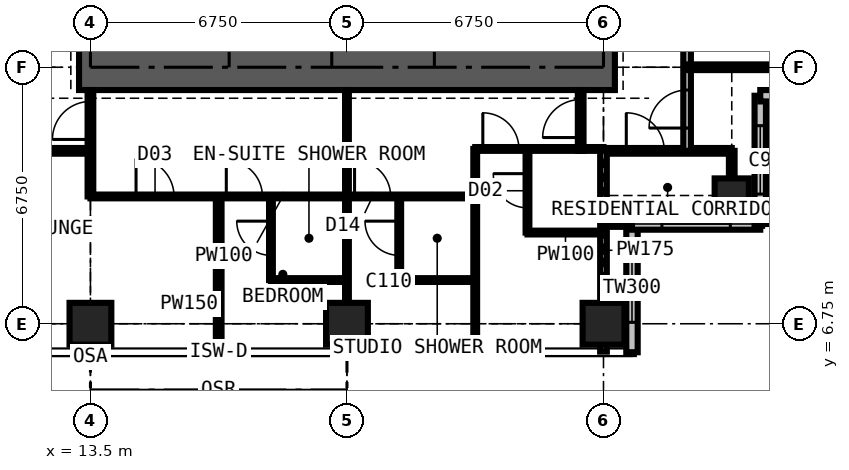
"""IFC4 building model, lengths in metres.
Left out: names, types, materials, properties, quantities, classifications, styles, units other than length and angle.
Written with IfcOpenShell. Run it as: python <this file> out.ifc"""

import sys

from ifc_helpers import new_model, si_unit, direction, frame, frame_2d, origin, origin_2d, place, context, subcontext, project, spatial, rectangle, extrude, element, fill, save


model = new_model("IFC4")
c1 = context("Model", 3, precision=1e-05, world=origin(), true_north=direction((0.0, 1.0)))
c2 = subcontext(c1, "Body", "Model", "MODEL_VIEW")
j1 = project(units=[si_unit("LENGTHUNIT", "METRE"), si_unit("PLANEANGLEUNIT", "RADIAN")], contexts=[c1])
p1 = place(None, origin())
s1 = spatial("IfcSite", under=j1, at=p1, CompositionType="ELEMENT")
p2 = place(p1, origin())
s2 = spatial("IfcBuilding", under=s1, at=p2, CompositionType="ELEMENT")
p3 = place(p2, frame((0.0, 0.0, 222.3)))
s3 = spatial("IfcBuildingStorey", under=s2, at=p3, CompositionType="ELEMENT", Elevation=222.3)
for number, where, z_axis, x_axis in (
    (1, (13.5, 6.75, 0.0), (0.0, 0.0, 1.0), (1.0, 0.0, 0.0)),
    (2, (20.25, 6.75, 0.0), (0.0, 0.0, 1.0), (1.0, 0.0, 0.0)),
    (3, (27.0, 6.75, 0.0), (0.0, 0.0, 1.0), (1.0, 0.0, 0.0)),
):
    element("IfcColumn", number, at=place(p3, frame(where, z_axis=z_axis, x_axis=x_axis)), inside=s3, PredefinedType="COLUMN", context=c2, shape_type="SweptSolid", body=[
        extrude(rectangle(XDim=1.1, YDim=1.1, at=origin_2d()), origin(), (0.0, 0.0, 1.0), 3.6),
    ])
p4 = place(p3, frame((30.375, 10.125, 0.0), z_axis=(0.0, 0.0, 1.0), x_axis=(1.0, 0.0, 0.0)))
e4 = element("IfcColumn", 4, at=p4, inside=s3, PredefinedType="COLUMN", context=c2, shape_type="SweptSolid", body=[
    extrude(rectangle(XDim=0.9, YDim=0.9, at=origin_2d()), origin(), (0.0, 0.0, 1.0), 3.6),
])
p5 = place(p3, frame((13.2, 13.5, 0.0), z_axis=(0.0, 0.0, 1.0), x_axis=(1.0, 0.0, 0.0)))
e5 = element("IfcWall", 5, at=p5, inside=s3, PredefinedType="SHEAR", context=c2, shape_type="SweptSolid", body=[
    extrude(rectangle(XDim=14.1, YDim=1.2, at=frame_2d((7.05, 0.0))), origin(), (0.0, 0.0, 1.0), 3.6),
])
p6 = place(p3, frame((27.75, 6.0, 0.0), z_axis=(0.0, 0.0, 1.0), x_axis=(0.0, 1.0, 0.0)))
e6 = element("IfcWall", 6, at=p6, inside=s3, PredefinedType="SOLIDWALL", context=c2, shape_type="SweptSolid", body=[
    extrude(rectangle(XDim=3.375, YDim=0.3, at=frame_2d((1.688, 0.0))), origin(), (0.0, 0.0, 1.0), 3.375),
])
p7 = place(p6, frame((0.788, 0.0, 0.6)))
e7 = element("IfcOpeningElement", 7, at=p7, cuts=e6, PredefinedType="OPENING", context=c2, shape_type="SweptSolid", body=[
    extrude(rectangle(XDim=1.8, YDim=2.1, at=frame_2d((0.9, 1.05))), frame((0.0, 0.16, 0.0), z_axis=(0.0, -1.0, 0.0), x_axis=(1.0, 0.0, 0.0)), (0.0, 0.0, 1.0), 0.32),
])
p8 = place(p3, frame((27.75, 9.375, 0.0), z_axis=(0.0, 0.0, 1.0), x_axis=(1.0, 0.0, 0.0)))
e8 = element("IfcWall", 8, at=p8, inside=s3, PredefinedType="SOLIDWALL", context=c2, shape_type="SweptSolid", body=[
    extrude(rectangle(XDim=3.375, YDim=0.3, at=frame_2d((1.688, 0.0))), origin(), (0.0, 0.0, 1.0), 3.375),
])
p9 = place(p8, frame((0.788, 0.0, 0.6)))
e9 = element("IfcOpeningElement", 9, at=p9, cuts=e8, PredefinedType="OPENING", context=c2, shape_type="SweptSolid", body=[
    extrude(rectangle(XDim=1.8, YDim=2.1, at=frame_2d((0.9, 1.05))), frame((0.0, 0.16, 0.0), z_axis=(0.0, -1.0, 0.0), x_axis=(1.0, 0.0, 0.0)), (0.0, 0.0, 1.0), 0.32),
])
p10 = place(p3, frame((31.125, 9.375, 0.0), z_axis=(0.0, 0.0, 1.0), x_axis=(0.0, 1.0, 0.0)))
e10 = element("IfcWall", 10, at=p10, inside=s3, PredefinedType="SOLIDWALL", context=c2, shape_type="SweptSolid", body=[
    extrude(rectangle(XDim=3.375, YDim=0.3, at=frame_2d((1.688, 0.0))), origin(), (0.0, 0.0, 1.0), 3.375),
])
p11 = place(p10, frame((0.788, 0.0, 0.6)))
e11 = element("IfcOpeningElement", 11, at=p11, cuts=e10, PredefinedType="OPENING", context=c2, shape_type="SweptSolid", body=[
    extrude(rectangle(XDim=1.8, YDim=2.1, at=frame_2d((0.9, 1.05))), frame((0.0, 0.16, 0.0), z_axis=(0.0, -1.0, 0.0), x_axis=(1.0, 0.0, 0.0)), (0.0, 0.0, 1.0), 0.32),
])
p12 = place(p3, frame((31.125, 12.75, 0.0), z_axis=(0.0, 0.0, 1.0), x_axis=(1.0, 0.0, 0.0)))
e12 = element("IfcWall", 12, at=p12, inside=s3, PredefinedType="SOLIDWALL", context=c2, shape_type="SweptSolid", body=[
    extrude(rectangle(XDim=3.375, YDim=0.3, at=frame_2d((1.688, 0.0))), origin(), (0.0, 0.0, 1.0), 3.375),
])
p13 = place(p12, frame((0.788, 0.0, 0.6)))
e13 = element("IfcOpeningElement", 13, at=p13, cuts=e12, PredefinedType="OPENING", context=c2, shape_type="SweptSolid", body=[
    extrude(rectangle(XDim=1.8, YDim=2.1, at=frame_2d((0.9, 1.05))), frame((0.0, 0.16, 0.0), z_axis=(0.0, -1.0, 0.0), x_axis=(1.0, 0.0, 0.0)), (0.0, 0.0, 1.0), 0.32),
])
p14 = place(p3, frame((10.125, 11.3, 0.0), z_axis=(0.0, 0.0, 1.0), x_axis=(1.0, 0.0, 0.0)))
e14 = element("IfcWall", 14, at=p14, inside=s3, PredefinedType="PARTITIONING", context=c2, shape_type="SweptSolid", body=[
    extrude(rectangle(XDim=3.375, YDim=0.15, at=frame_2d((1.688, 0.0))), origin(), (0.0, 0.0, 1.0), 3.375),
])
p15 = place(p3, frame((13.5, 10.1, 0.0), z_axis=(0.0, 0.0, 1.0), x_axis=(0.0, 1.0, 0.0)))
e15 = element("IfcWall", 15, at=p15, inside=s3, PredefinedType="PARTITIONING", context=c2, shape_type="SweptSolid", body=[
    extrude(rectangle(XDim=2.8, YDim=0.15, at=frame_2d((1.4, 0.0))), origin(), (0.0, 0.0, 1.0), 2.877),
])
p16 = place(p15, frame((1.5, 0.0, 0.0)))
e16 = element("IfcOpeningElement", 16, at=p16, cuts=e15, PredefinedType="OPENING", context=c2, shape_type="SweptSolid", body=[
    extrude(rectangle(XDim=1.0, YDim=2.2, at=frame_2d((0.5, 1.1))), frame((0.0, 0.085, 0.0), z_axis=(0.0, -1.0, 0.0), x_axis=(1.0, 0.0, 0.0)), (0.0, 0.0, 1.0), 0.17),
])
p17 = place(p3, frame((13.5, 10.1, 0.0), z_axis=(0.0, 0.0, 1.0), x_axis=(1.0, 0.0, 0.0)))
e17 = element("IfcWall", 17, at=p17, inside=s3, PredefinedType="PARTITIONING", context=c2, shape_type="SweptSolid", body=[
    extrude(rectangle(XDim=10.125, YDim=0.1, at=frame_2d((5.062, 0.0))), origin(), (0.0, 0.0, 1.0), 3.375),
])
p18 = place(p17, frame((1.2, 0.0, 0.0)))
e18 = element("IfcOpeningElement", 18, at=p18, cuts=e17, PredefinedType="OPENING", context=c2, shape_type="SweptSolid", body=[
    extrude(rectangle(XDim=1.0, YDim=2.2, at=frame_2d((0.5, 1.1))), frame((0.0, 0.06, 0.0), z_axis=(0.0, -1.0, 0.0), x_axis=(1.0, 0.0, 0.0)), (0.0, 0.0, 1.0), 0.12),
])
p19 = place(p17, frame((3.575, 0.0, 0.0)))
e19 = element("IfcOpeningElement", 19, at=p19, cuts=e17, PredefinedType="OPENING", context=c2, shape_type="SweptSolid", body=[
    extrude(rectangle(XDim=0.95, YDim=2.2, at=frame_2d((0.475, 1.1))), frame((0.0, 0.06, 0.0), z_axis=(0.0, -1.0, 0.0), x_axis=(1.0, 0.0, 0.0)), (0.0, 0.0, 1.0), 0.12),
])
p20 = place(p17, frame((6.95, 0.0, 0.0)))
e20 = element("IfcOpeningElement", 20, at=p20, cuts=e17, PredefinedType="OPENING", context=c2, shape_type="SweptSolid", body=[
    extrude(rectangle(XDim=0.95, YDim=2.2, at=frame_2d((0.475, 1.1))), frame((0.0, 0.06, 0.0), z_axis=(0.0, -1.0, 0.0), x_axis=(1.0, 0.0, 0.0)), (0.0, 0.0, 1.0), 0.12),
])
p21 = place(p3, frame((16.875, 6.016, 0.0), z_axis=(0.0, 0.0, 1.0), x_axis=(0.0, 1.0, 0.0)))
e21 = element("IfcWall", 21, at=p21, inside=s3, PredefinedType="PARTITIONING", context=c2, shape_type="SweptSolid", body=[
    extrude(rectangle(XDim=4.084, YDim=0.15, at=frame_2d((2.042, 0.0))), origin(), (0.0, 0.0, 1.0), 3.375),
])
p22 = place(p3, frame((18.25, 7.9, 0.0), z_axis=(0.0, 0.0, 1.0), x_axis=(0.0, 1.0, 0.0)))
e22 = element("IfcWall", 22, at=p22, inside=s3, PredefinedType="PARTITIONING", context=c2, shape_type="SweptSolid", body=[
    extrude(rectangle(XDim=2.2, YDim=0.1, at=frame_2d((1.1, 0.0))), origin(), (0.0, 0.0, 1.0), 3.375),
])
p23 = place(p22, frame((0.65, 0.0, 0.0)))
e23 = element("IfcOpeningElement", 23, at=p23, cuts=e22, PredefinedType="OPENING", context=c2, shape_type="SweptSolid", body=[
    extrude(rectangle(XDim=0.9, YDim=2.2, at=frame_2d((0.45, 1.1))), frame((0.0, 0.06, 0.0), z_axis=(0.0, -1.0, 0.0), x_axis=(1.0, 0.0, 0.0)), (0.0, 0.0, 1.0), 0.12),
])
p24 = place(p3, frame((18.25, 7.9, 0.0), z_axis=(0.0, 0.0, 1.0), x_axis=(1.0, 0.0, 0.0)))
e24 = element("IfcWall", 24, at=p24, inside=s3, PredefinedType="PARTITIONING", context=c2, shape_type="SweptSolid", body=[
    extrude(rectangle(XDim=2.0, YDim=0.1, at=frame_2d((1.0, 0.0))), origin(), (0.0, 0.0, 1.0), 3.375),
])
p25 = place(p3, frame((20.25, 6.016, 0.0), z_axis=(0.0, 0.0, 1.0), x_axis=(0.0, 1.0, 0.0)))
e25 = element("IfcWall", 25, at=p25, inside=s3, PredefinedType="PARTITIONING", context=c2, shape_type="SweptSolid", body=[
    extrude(rectangle(XDim=6.884, YDim=0.1, at=frame_2d((3.442, 0.0))), origin(), (0.0, 0.0, 1.0), 2.61),
])
p26 = place(p3, frame((21.625, 7.9, 0.0), z_axis=(0.0, 0.0, 1.0), x_axis=(0.0, 1.0, 0.0)))
e26 = element("IfcWall", 26, at=p26, inside=s3, PredefinedType="PARTITIONING", context=c2, shape_type="SweptSolid", body=[
    extrude(rectangle(XDim=2.2, YDim=0.1, at=frame_2d((1.1, 0.0))), origin(), (0.0, 0.0, 1.0), 3.375),
])
p27 = place(p26, frame((0.65, 0.0, 0.0)))
e27 = element("IfcOpeningElement", 27, at=p27, cuts=e26, PredefinedType="OPENING", context=c2, shape_type="SweptSolid", body=[
    extrude(rectangle(XDim=0.9, YDim=2.2, at=frame_2d((0.45, 1.1))), frame((0.0, 0.06, 0.0), z_axis=(0.0, -1.0, 0.0), x_axis=(1.0, 0.0, 0.0)), (0.0, 0.0, 1.0), 0.12),
])
p28 = place(p3, frame((21.625, 7.9, 0.0), z_axis=(0.0, 0.0, 1.0), x_axis=(1.0, 0.0, 0.0)))
e28 = element("IfcWall", 28, at=p28, inside=s3, PredefinedType="PARTITIONING", context=c2, shape_type="SweptSolid", body=[
    extrude(rectangle(XDim=2.0, YDim=0.1, at=frame_2d((1.0, 0.0))), origin(), (0.0, 0.0, 1.0), 3.375),
])
p29 = place(p3, frame((23.625, 6.016, 0.0), z_axis=(0.0, 0.0, 1.0), x_axis=(0.0, 1.0, 0.0)))
e29 = element("IfcWall", 29, at=p29, inside=s3, PredefinedType="PARTITIONING", context=c2, shape_type="SweptSolid", body=[
    extrude(rectangle(XDim=5.334, YDim=0.1, at=frame_2d((2.667, 0.0))), origin(), (0.0, 0.0, 1.0), 3.375),
])
p30 = place(p3, frame((23.625, 11.35, 0.0), z_axis=(0.0, 0.0, 1.0), x_axis=(1.0, 0.0, 0.0)))
e30 = element("IfcWall", 30, at=p30, inside=s3, PredefinedType="PARTITIONING", context=c2, shape_type="SweptSolid", body=[
    extrude(rectangle(XDim=3.375, YDim=0.1, at=frame_2d((1.688, 0.0))), origin(), (0.0, 0.0, 1.0), 3.375),
])
p31 = place(p30, frame((0.2, 0.0, 0.0)))
e31 = element("IfcOpeningElement", 31, at=p31, cuts=e30, PredefinedType="OPENING", context=c2, shape_type="SweptSolid", body=[
    extrude(rectangle(XDim=0.95, YDim=2.2, at=frame_2d((0.475, 1.1))), frame((0.0, 0.06, 0.0), z_axis=(0.0, -1.0, 0.0), x_axis=(1.0, 0.0, 0.0)), (0.0, 0.0, 1.0), 0.12),
])
p32 = place(p3, frame((25.0, 9.15, 0.0), z_axis=(0.0, 0.0, 1.0), x_axis=(0.0, 1.0, 0.0)))
e32 = element("IfcWall", 32, at=p32, inside=s3, PredefinedType="PARTITIONING", context=c2, shape_type="SweptSolid", body=[
    extrude(rectangle(XDim=2.2, YDim=0.1, at=frame_2d((1.1, 0.0))), origin(), (0.0, 0.0, 1.0), 3.375),
])
p33 = place(p32, frame((0.65, 0.0, 0.0)))
e33 = element("IfcOpeningElement", 33, at=p33, cuts=e32, PredefinedType="OPENING", context=c2, shape_type="SweptSolid", body=[
    extrude(rectangle(XDim=0.9, YDim=2.2, at=frame_2d((0.45, 1.1))), frame((0.0, 0.06, 0.0), z_axis=(0.0, -1.0, 0.0), x_axis=(1.0, 0.0, 0.0)), (0.0, 0.0, 1.0), 0.12),
])
p34 = place(p3, frame((25.0, 9.15, 0.0), z_axis=(0.0, 0.0, 1.0), x_axis=(1.0, 0.0, 0.0)))
e34 = element("IfcWall", 34, at=p34, inside=s3, PredefinedType="PARTITIONING", context=c2, shape_type="SweptSolid", body=[
    extrude(rectangle(XDim=2.0, YDim=0.1, at=frame_2d((1.0, 0.0))), origin(), (0.0, 0.0, 1.0), 3.375),
])
p35 = place(p3, frame((26.4, 11.3, 0.0), z_axis=(0.0, 0.0, 1.0), x_axis=(0.0, 1.0, 0.0)))
e35 = element("IfcWall", 35, at=p35, inside=s3, PredefinedType="PARTITIONING", context=c2, shape_type="SweptSolid", body=[
    extrude(rectangle(XDim=1.6, YDim=0.15, at=frame_2d((0.8, 0.0))), origin(), (0.0, 0.0, 1.0), 3.375),
])
p36 = place(p35, frame((0.35, 0.0, 0.0)))
e36 = element("IfcOpeningElement", 36, at=p36, cuts=e35, PredefinedType="OPENING", context=c2, shape_type="SweptSolid", body=[
    extrude(rectangle(XDim=1.0, YDim=2.2, at=frame_2d((0.5, 1.1))), frame((0.0, 0.085, 0.0), z_axis=(0.0, -1.0, 0.0), x_axis=(1.0, 0.0, 0.0)), (0.0, 0.0, 1.0), 0.17),
])
p37 = place(p3, frame((27.0, 11.3, 0.0), z_axis=(0.0, 0.0, 1.0), x_axis=(1.0, 0.0, 0.0)))
e37 = element("IfcWall", 37, at=p37, inside=s3, PredefinedType="PARTITIONING", context=c2, shape_type="SweptSolid", body=[
    extrude(rectangle(XDim=3.375, YDim=0.15, at=frame_2d((1.688, 0.0))), origin(), (0.0, 0.0, 1.0), 3.375),
])
p38 = place(p37, frame((0.6, 0.0, 0.0)))
e38 = element("IfcOpeningElement", 38, at=p38, cuts=e37, PredefinedType="OPENING", context=c2, shape_type="SweptSolid", body=[
    extrude(rectangle(XDim=1.0, YDim=2.2, at=frame_2d((0.5, 1.1))), frame((0.0, 0.085, 0.0), z_axis=(0.0, -1.0, 0.0), x_axis=(1.0, 0.0, 0.0)), (0.0, 0.0, 1.0), 0.17),
])
p39 = place(p3, frame((27.0, 6.016, 0.0), z_axis=(0.0, 0.0, 1.0), x_axis=(0.0, 1.0, 0.0)))
e39 = element("IfcWall", 39, at=p39, inside=s3, PredefinedType="PARTITIONING", context=c2, shape_type="SweptSolid", body=[
    extrude(rectangle(XDim=5.334, YDim=0.175, at=frame_2d((2.667, 0.0))), origin(), (0.0, 0.0, 1.0), 2.877),
])
p40 = place(p3, frame((27.0, 9.375, 0.0), z_axis=(0.0, 0.0, 1.0), x_axis=(1.0, 0.0, 0.0)))
e40 = element("IfcWall", 40, at=p40, inside=s3, PredefinedType="PARTITIONING", context=c2, shape_type="SweptSolid", body=[
    extrude(rectangle(XDim=0.734, YDim=0.15, at=frame_2d((0.367, 0.0))), origin(), (0.0, 0.0, 1.0), 3.375),
])
p41 = place(p3, frame((29.2, 11.3, 0.0), z_axis=(0.0, 0.0, 1.0), x_axis=(0.0, 1.0, 0.0)))
e41 = element("IfcWall", 41, at=p41, inside=s3, PredefinedType="PARTITIONING", context=c2, shape_type="SweptSolid", body=[
    extrude(rectangle(XDim=17.9, YDim=0.2, at=frame_2d((8.95, 0.0))), origin(), (0.0, 0.0, 1.0), 3.375),
])
p42 = place(p41, frame((0.6, 0.0, 0.0)))
e42 = element("IfcOpeningElement", 42, at=p42, cuts=e41, PredefinedType="OPENING", context=c2, shape_type="SweptSolid", body=[
    extrude(rectangle(XDim=1.0, YDim=2.2, at=frame_2d((0.5, 1.1))), frame((0.0, 0.11, 0.0), z_axis=(0.0, -1.0, 0.0), x_axis=(1.0, 0.0, 0.0)), (0.0, 0.0, 1.0), 0.22),
])
p43 = place(p41, frame((10.55, 0.0, 0.0)))
e43 = element("IfcOpeningElement", 43, at=p43, cuts=e41, PredefinedType="OPENING", context=c2, shape_type="SweptSolid", body=[
    extrude(rectangle(XDim=0.95, YDim=2.2, at=frame_2d((0.475, 1.1))), frame((0.0, 0.11, 0.0), z_axis=(0.0, -1.0, 0.0), x_axis=(1.0, 0.0, 0.0)), (0.0, 0.0, 1.0), 0.22),
])
p44 = place(p41, frame((3.8, 0.0, 0.0)))
e44 = element("IfcOpeningElement", 44, at=p44, cuts=e41, PredefinedType="OPENING", context=c2, shape_type="SweptSolid", body=[
    extrude(rectangle(XDim=0.95, YDim=2.2, at=frame_2d((0.475, 1.1))), frame((0.0, 0.11, 0.0), z_axis=(0.0, -1.0, 0.0), x_axis=(1.0, 0.0, 0.0)), (0.0, 0.0, 1.0), 0.22),
])
p45 = place(p41, frame((16.3, 0.0, 0.0)))
e45 = element("IfcOpeningElement", 45, at=p45, cuts=e41, PredefinedType="OPENING", context=c2, shape_type="SweptSolid", body=[
    extrude(rectangle(XDim=1.0, YDim=2.2, at=frame_2d((0.5, 1.1))), frame((0.0, 0.11, 0.0), z_axis=(0.0, -1.0, 0.0), x_axis=(1.0, 0.0, 0.0)), (0.0, 0.0, 1.0), 0.22),
])
p46 = place(p3, frame((29.2, 13.5, 0.0), z_axis=(0.0, 0.0, 1.0), x_axis=(1.0, 0.0, 0.0)))
e46 = element("IfcWall", 46, at=p46, inside=s3, PredefinedType="PARTITIONING", context=c2, shape_type="SweptSolid", body=[
    extrude(rectangle(XDim=5.284, YDim=0.15, at=frame_2d((2.642, 0.0))), origin(), (0.0, 0.0, 1.0), 2.877),
])
p47 = place(p3, frame((30.375, 9.525, 0.0), z_axis=(0.0, 0.0, 1.0), x_axis=(0.0, 1.0, 0.0)))
e47 = element("IfcWall", 47, at=p47, inside=s3, PredefinedType="PARTITIONING", context=c2, shape_type="SweptSolid", body=[
    extrude(rectangle(XDim=1.775, YDim=0.15, at=frame_2d((0.888, 0.0))), origin(), (0.0, 0.0, 1.0), 2.877),
])
p48 = place(p7, origin())
e48 = element("IfcWindow", 48, at=p48, inside=s3, PartitioningType="SINGLE_PANEL", PredefinedType="WINDOW", context=c2, shape_type="SweptSolid", body=[
    extrude(rectangle(XDim=1.8, YDim=2.1, at=frame_2d((0.9, 1.05))), frame((0.0, 0.03, 0.0), z_axis=(0.0, -1.0, 0.0), x_axis=(1.0, 0.0, 0.0)), (0.0, 0.0, 1.0), 0.06),
])
fill(e7, e48)
p49 = place(p9, origin())
e49 = element("IfcWindow", 49, at=p49, inside=s3, PartitioningType="SINGLE_PANEL", PredefinedType="WINDOW", context=c2, shape_type="SweptSolid", body=[
    extrude(rectangle(XDim=1.8, YDim=2.1, at=frame_2d((0.9, 1.05))), frame((0.0, 0.03, 0.0), z_axis=(0.0, -1.0, 0.0), x_axis=(1.0, 0.0, 0.0)), (0.0, 0.0, 1.0), 0.06),
])
fill(e9, e49)
p50 = place(p11, origin())
e50 = element("IfcWindow", 50, at=p50, inside=s3, PartitioningType="SINGLE_PANEL", PredefinedType="WINDOW", context=c2, shape_type="SweptSolid", body=[
    extrude(rectangle(XDim=1.8, YDim=2.1, at=frame_2d((0.9, 1.05))), frame((0.0, 0.03, 0.0), z_axis=(0.0, -1.0, 0.0), x_axis=(1.0, 0.0, 0.0)), (0.0, 0.0, 1.0), 0.06),
])
fill(e11, e50)
p51 = place(p18, origin())
e51 = element("IfcDoor", 51, at=p51, inside=s3, OperationType="SINGLE_SWING_LEFT", PredefinedType="DOOR", context=c2, shape_type="SweptSolid", body=[
    extrude(rectangle(XDim=1.0, YDim=2.2, at=frame_2d((0.5, 1.1))), frame((0.0, 0.025, 0.0), z_axis=(0.0, -1.0, 0.0), x_axis=(1.0, 0.0, 0.0)), (0.0, 0.0, 1.0), 0.05),
])
fill(e18, e51)
p52 = place(p19, origin())
e52 = element("IfcDoor", 52, at=p52, inside=s3, OperationType="SINGLE_SWING_LEFT", PredefinedType="DOOR", context=c2, shape_type="SweptSolid", body=[
    extrude(rectangle(XDim=0.95, YDim=2.2, at=frame_2d((0.475, 1.1))), frame((0.0, 0.025, 0.0), z_axis=(0.0, -1.0, 0.0), x_axis=(1.0, 0.0, 0.0)), (0.0, 0.0, 1.0), 0.05),
])
fill(e19, e52)
p53 = place(p23, origin())
e53 = element("IfcDoor", 53, at=p53, inside=s3, OperationType="SINGLE_SWING_RIGHT", PredefinedType="DOOR", context=c2, shape_type="SweptSolid", body=[
    extrude(rectangle(XDim=0.9, YDim=2.2, at=frame_2d((0.45, 1.1))), frame((0.0, 0.025, 0.0), z_axis=(0.0, -1.0, 0.0), x_axis=(1.0, 0.0, 0.0)), (0.0, 0.0, 1.0), 0.05),
])
fill(e23, e53)
p54 = place(p16, origin())
e54 = element("IfcDoor", 54, at=p54, inside=s3, OperationType="SINGLE_SWING_LEFT", PredefinedType="DOOR", context=c2, shape_type="SweptSolid", body=[
    extrude(rectangle(XDim=1.0, YDim=2.2, at=frame_2d((0.5, 1.1))), frame((0.0, 0.025, 0.0), z_axis=(0.0, -1.0, 0.0), x_axis=(1.0, 0.0, 0.0)), (0.0, 0.0, 1.0), 0.05),
])
fill(e16, e54)
p55 = place(p20, origin())
e55 = element("IfcDoor", 55, at=p55, inside=s3, OperationType="SINGLE_SWING_LEFT", PredefinedType="DOOR", context=c2, shape_type="SweptSolid", body=[
    extrude(rectangle(XDim=0.95, YDim=2.2, at=frame_2d((0.475, 1.1))), frame((0.0, 0.025, 0.0), z_axis=(0.0, -1.0, 0.0), x_axis=(1.0, 0.0, 0.0)), (0.0, 0.0, 1.0), 0.05),
])
fill(e20, e55)
p56 = place(p27, origin())
e56 = element("IfcDoor", 56, at=p56, inside=s3, OperationType="SINGLE_SWING_RIGHT", PredefinedType="DOOR", context=c2, shape_type="SweptSolid", body=[
    extrude(rectangle(XDim=0.9, YDim=2.2, at=frame_2d((0.45, 1.1))), frame((0.0, 0.025, 0.0), z_axis=(0.0, -1.0, 0.0), x_axis=(1.0, 0.0, 0.0)), (0.0, 0.0, 1.0), 0.05),
])
fill(e27, e56)
p57 = place(p31, origin())
e57 = element("IfcDoor", 57, at=p57, inside=s3, OperationType="SINGLE_SWING_LEFT", PredefinedType="DOOR", context=c2, shape_type="SweptSolid", body=[
    extrude(rectangle(XDim=0.95, YDim=2.2, at=frame_2d((0.475, 1.1))), frame((0.0, 0.025, 0.0), z_axis=(0.0, -1.0, 0.0), x_axis=(1.0, 0.0, 0.0)), (0.0, 0.0, 1.0), 0.05),
])
fill(e31, e57)
p58 = place(p33, origin())
e58 = element("IfcDoor", 58, at=p58, inside=s3, OperationType="SINGLE_SWING_RIGHT", PredefinedType="DOOR", context=c2, shape_type="SweptSolid", body=[
    extrude(rectangle(XDim=0.9, YDim=2.2, at=frame_2d((0.45, 1.1))), frame((0.0, 0.025, 0.0), z_axis=(0.0, -1.0, 0.0), x_axis=(1.0, 0.0, 0.0)), (0.0, 0.0, 1.0), 0.05),
])
fill(e33, e58)
p59 = place(p38, origin())
e59 = element("IfcDoor", 59, at=p59, inside=s3, OperationType="SINGLE_SWING_LEFT", PredefinedType="DOOR", context=c2, shape_type="SweptSolid", body=[
    extrude(rectangle(XDim=1.0, YDim=2.2, at=frame_2d((0.5, 1.1))), frame((0.0, 0.025, 0.0), z_axis=(0.0, -1.0, 0.0), x_axis=(1.0, 0.0, 0.0)), (0.0, 0.0, 1.0), 0.05),
])
fill(e38, e59)
p60 = place(p36, origin())
e60 = element("IfcDoor", 60, at=p60, inside=s3, OperationType="SINGLE_SWING_LEFT", PredefinedType="DOOR", context=c2, shape_type="SweptSolid", body=[
    extrude(rectangle(XDim=1.0, YDim=2.2, at=frame_2d((0.5, 1.1))), frame((0.0, 0.025, 0.0), z_axis=(0.0, -1.0, 0.0), x_axis=(1.0, 0.0, 0.0)), (0.0, 0.0, 1.0), 0.05),
])
fill(e36, e60)
p61 = place(p42, origin())
e61 = element("IfcDoor", 61, at=p61, inside=s3, OperationType="SINGLE_SWING_LEFT", PredefinedType="DOOR", context=c2, shape_type="SweptSolid", body=[
    extrude(rectangle(XDim=1.0, YDim=2.2, at=frame_2d((0.5, 1.1))), frame((0.0, 0.025, 0.0), z_axis=(0.0, -1.0, 0.0), x_axis=(1.0, 0.0, 0.0)), (0.0, 0.0, 1.0), 0.05),
])
fill(e42, e61)
save(model, sys.argv[1])
